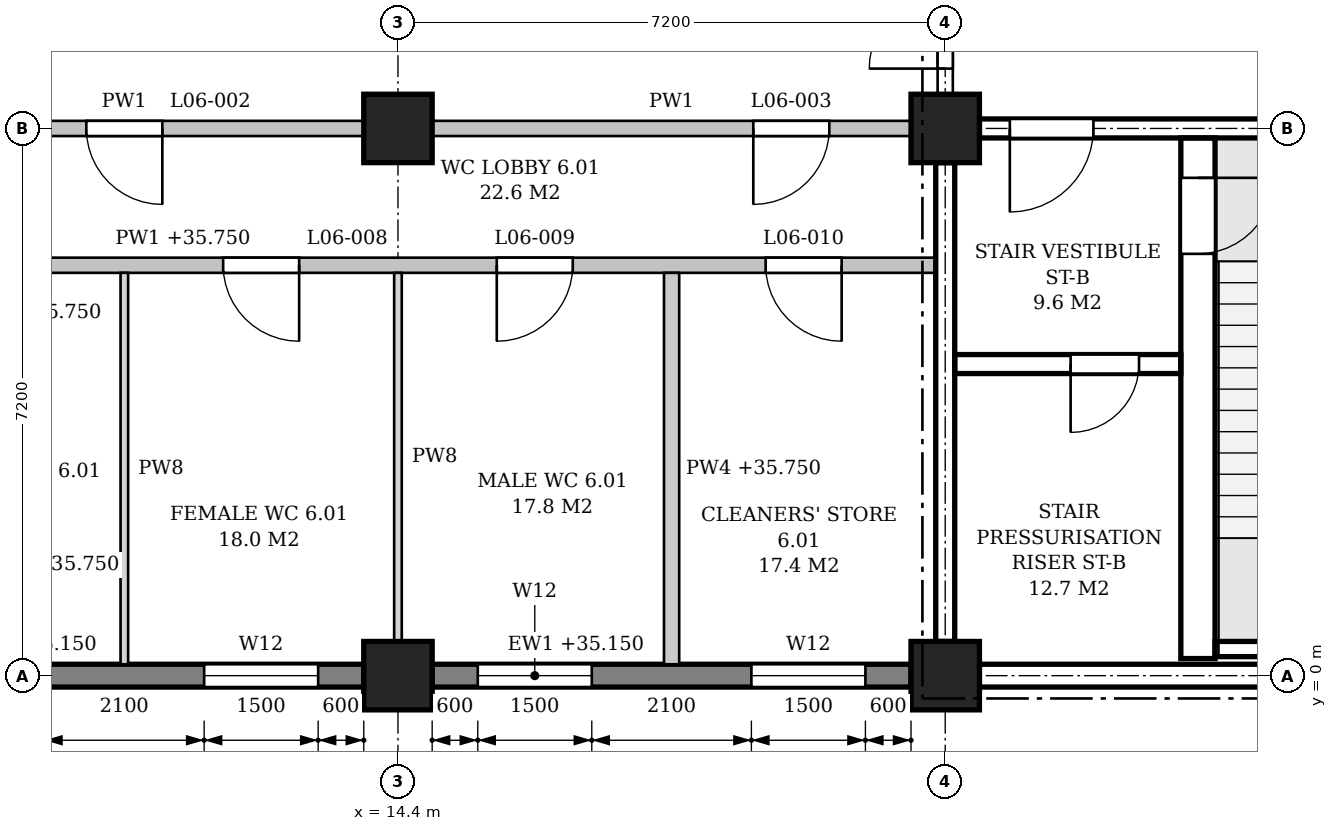
"""IFC4 building model, lengths in metres.
Left out: names, types, materials, properties, quantities, classifications, styles, units other than length and angle.
Written with IfcOpenShell. Run it as: python <this file> out.ifc"""

import sys

from ifc_helpers import new_model, si_unit, direction, frame, frame_2d, origin, origin_2d, place, context, subcontext, project, spatial, polyline, rectangle, outline, extrude, element, fill, save


model = new_model("IFC4")
c1 = context("Model", 3, precision=1e-05, world=origin(), true_north=direction((0.0, 1.0)))
c2 = subcontext(c1, "Body", "Model", "MODEL_VIEW")
j1 = project(units=[si_unit("LENGTHUNIT", "METRE"), si_unit("PLANEANGLEUNIT", "RADIAN")], contexts=[c1])
p1 = place(None, origin())
s1 = spatial("IfcSite", under=j1, at=p1, CompositionType="ELEMENT")
p2 = place(p1, origin())
s2 = spatial("IfcBuilding", under=s1, at=p2, CompositionType="ELEMENT")
p3 = place(p2, frame((0.0, 0.0, 31.2)))
s3 = spatial("IfcBuildingStorey", under=s2, at=p3, CompositionType="ELEMENT", Elevation=31.2)
for number, where, z_axis, x_axis in (
    (1, (14.4, 0.0, 0.0), (0.0, 0.0, 1.0), (1.0, 0.0, 0.0)),
    (2, (14.4, 7.2, 0.0), (0.0, 0.0, 1.0), (1.0, 0.0, 0.0)),
    (3, (21.6, 0.0, 0.0), (0.0, 0.0, 1.0), (1.0, 0.0, 0.0)),
    (4, (21.6, 7.2, 0.0), (0.0, 0.0, 1.0), (1.0, 0.0, 0.0)),
):
    element("IfcColumn", number, at=place(p3, frame(where, z_axis=z_axis, x_axis=x_axis)), inside=s3, PredefinedType="COLUMN", context=c2, shape_type="SweptSolid", body=[
        extrude(rectangle(XDim=0.9, YDim=0.9, at=origin_2d()), origin(), (0.0, 0.0, 1.0), 4.8),
    ])
p4 = place(p3, frame((7.65, 0.0, 0.0), z_axis=(0.0, 0.0, 1.0), x_axis=(1.0, 0.0, 0.0)))
e5 = element("IfcWall", 5, at=p4, inside=s3, PredefinedType="STANDARD", context=c2, shape_type="SweptSolid", body=[
    extrude(rectangle(XDim=6.3, YDim=0.3, at=frame_2d((3.15, 0.0))), origin(), (0.0, 0.0, 1.0), 3.95),
])
p5 = place(p4, frame((0.6, 0.0, 0.9)))
e6 = element("IfcOpeningElement", 6, at=p5, cuts=e5, PredefinedType="OPENING", context=c2, shape_type="SweptSolid", body=[
    extrude(outline(polyline([(0.0, 0.0), (1.5, 0.0), (1.5, 1.75), (0.75, 2.5), (0.0, 1.75), (0.0, 0.0)])), frame((0.0, 0.16, 0.0), z_axis=(0.0, -1.0, 0.0), x_axis=(1.0, 0.0, 0.0)), (0.0, 0.0, 1.0), 0.32),
])
p6 = place(p4, frame((4.2, 0.0, 0.9)))
e7 = element("IfcOpeningElement", 7, at=p6, cuts=e5, PredefinedType="OPENING", context=c2, shape_type="SweptSolid", body=[
    extrude(outline(polyline([(0.0, 0.0), (1.5, 0.0), (1.5, 1.75), (0.75, 2.5), (0.0, 1.75), (0.0, 0.0)])), frame((0.0, 0.16, 0.0), z_axis=(0.0, -1.0, 0.0), x_axis=(1.0, 0.0, 0.0)), (0.0, 0.0, 1.0), 0.32),
])
p7 = place(p3, frame((14.85, 0.0, 0.0), z_axis=(0.0, 0.0, 1.0), x_axis=(1.0, 0.0, 0.0)))
e8 = element("IfcWall", 8, at=p7, inside=s3, PredefinedType="STANDARD", context=c2, shape_type="SweptSolid", body=[
    extrude(rectangle(XDim=6.3, YDim=0.3, at=frame_2d((3.15, 0.0))), origin(), (0.0, 0.0, 1.0), 3.95),
])
p8 = place(p7, frame((0.6, 0.0, 0.9)))
e9 = element("IfcOpeningElement", 9, at=p8, cuts=e8, PredefinedType="OPENING", context=c2, shape_type="SweptSolid", body=[
    extrude(outline(polyline([(0.0, 0.0), (1.5, 0.0), (1.5, 1.75), (0.75, 2.5), (0.0, 1.75), (0.0, 0.0)])), frame((0.0, 0.16, 0.0), z_axis=(0.0, -1.0, 0.0), x_axis=(1.0, 0.0, 0.0)), (0.0, 0.0, 1.0), 0.32),
])
p9 = place(p7, frame((4.2, 0.0, 0.9)))
e10 = element("IfcOpeningElement", 10, at=p9, cuts=e8, PredefinedType="OPENING", context=c2, shape_type="SweptSolid", body=[
    extrude(outline(polyline([(0.0, 0.0), (1.5, 0.0), (1.5, 1.75), (0.75, 2.5), (0.0, 1.75), (0.0, 0.0)])), frame((0.0, 0.16, 0.0), z_axis=(0.0, -1.0, 0.0), x_axis=(1.0, 0.0, 0.0)), (0.0, 0.0, 1.0), 0.32),
])
p10 = place(p3, frame((22.05, 0.0, 0.0), z_axis=(0.0, 0.0, 1.0), x_axis=(1.0, 0.0, 0.0)))
e11 = element("IfcWall", 11, at=p10, inside=s3, PredefinedType="STANDARD", context=c2, shape_type="SweptSolid", body=[
    extrude(rectangle(XDim=6.3, YDim=0.3, at=frame_2d((3.15, 0.0))), origin(), (0.0, 0.0, 1.0), 3.95),
])
p11 = place(p10, frame((4.5, 0.0, 0.9)))
e12 = element("IfcOpeningElement", 12, at=p11, cuts=e11, PredefinedType="OPENING", context=c2, shape_type="SweptSolid", body=[
    extrude(outline(polyline([(0.0, 0.0), (0.9, 0.0), (0.9, 2.05), (0.45, 2.5), (0.0, 2.05), (0.0, 0.0)])), frame((0.0, 0.16, 0.0), z_axis=(0.0, -1.0, 0.0), x_axis=(1.0, 0.0, 0.0)), (0.0, 0.0, 1.0), 0.32),
])
p12 = place(p3, frame((22.05, 7.2, 0.0), z_axis=(0.0, 0.0, 1.0), x_axis=(1.0, 0.0, 0.0)))
e13 = element("IfcWall", 13, at=p12, inside=s3, PredefinedType="SHEAR", context=c2, shape_type="SweptSolid", body=[
    extrude(rectangle(XDim=6.3, YDim=0.25, at=frame_2d((3.15, 0.0))), origin(), (0.0, 0.0, 1.0), 3.8),
])
p13 = place(p12, frame((0.4, 0.0, 0.0)))
e14 = element("IfcOpeningElement", 14, at=p13, cuts=e13, PredefinedType="OPENING", context=c2, shape_type="SweptSolid", body=[
    extrude(rectangle(XDim=1.1, YDim=2.1, at=frame_2d((0.55, 1.05))), frame((0.0, 0.135, 0.0), z_axis=(0.0, -1.0, 0.0), x_axis=(1.0, 0.0, 0.0)), (0.0, 0.0, 1.0), 0.27),
])
p14 = place(p3, frame((21.6, 0.45, 0.0), z_axis=(0.0, 0.0, 1.0), x_axis=(0.0, 1.0, 0.0)))
e15 = element("IfcWall", 15, at=p14, inside=s3, PredefinedType="SHEAR", context=c2, shape_type="SweptSolid", body=[
    extrude(rectangle(XDim=6.3, YDim=0.25, at=frame_2d((3.15, 0.0))), origin(), (0.0, 0.0, 1.0), 3.8),
])
p15 = place(p3, frame((25.15, 0.35, -0.25), z_axis=(0.0, 0.0, 1.0), x_axis=(1.0, 0.0, 0.0)))
e16 = element("IfcWall", 16, at=p15, inside=s3, PredefinedType="SHEAR", context=c2, shape_type="SweptSolid", body=[
    extrude(rectangle(XDim=1.4, YDim=0.2, at=frame_2d((0.7, 0.0))), origin(), (0.0, 0.0, 1.0), 4.8),
])
p16 = place(p3, frame((24.925, 0.225, 0.0), z_axis=(0.0, 0.0, 1.0), x_axis=(0.0, 1.0, 0.0)))
e17 = element("IfcWall", 17, at=p16, inside=s3, PredefinedType="SHEAR", context=c2, shape_type="SweptSolid", body=[
    extrude(rectangle(XDim=6.85, YDim=0.45, at=frame_2d((3.425, 0.0))), origin(), (0.0, 0.0, 1.0), 4.55),
])
p17 = place(p16, frame((5.325, 0.0, 0.0)))
e18 = element("IfcOpeningElement", 18, at=p17, cuts=e17, PredefinedType="OPENING", context=c2, shape_type="SweptSolid", body=[
    extrude(rectangle(XDim=1.0, YDim=2.1, at=frame_2d((0.5, 1.05))), frame((0.0, 0.235, 0.0), z_axis=(0.0, -1.0, 0.0), x_axis=(1.0, 0.0, 0.0)), (0.0, 0.0, 1.0), 0.47),
])
p18 = place(p3, frame((21.725, 4.1, 0.0), z_axis=(0.0, 0.0, 1.0), x_axis=(1.0, 0.0, 0.0)))
e19 = element("IfcWall", 19, at=p18, inside=s3, PredefinedType="SHEAR", context=c2, shape_type="SweptSolid", body=[
    extrude(rectangle(XDim=2.975, YDim=0.25, at=frame_2d((1.487, 0.0))), origin(), (0.0, 0.0, 1.0), 4.55),
])
p19 = place(p18, frame((1.525, 0.0, 0.0)))
e20 = element("IfcOpeningElement", 20, at=p19, cuts=e19, PredefinedType="OPENING", context=c2, shape_type="SweptSolid", body=[
    extrude(rectangle(XDim=0.9, YDim=2.1, at=frame_2d((0.45, 1.05))), frame((0.0, 0.135, 0.0), z_axis=(0.0, -1.0, 0.0), x_axis=(1.0, 0.0, 0.0)), (0.0, 0.0, 1.0), 0.27),
])
p20 = place(p3, frame((7.325, 5.4, 0.0), z_axis=(0.0, 0.0, 1.0), x_axis=(1.0, 0.0, 0.0)))
e21 = element("IfcWall", 21, at=p20, inside=s3, PredefinedType="PARTITIONING", context=c2, shape_type="SweptSolid", body=[
    extrude(outline(polyline([(0.0, 0.0), (14.15, 0.0), (14.15, 3.8), (14.025, 3.8), (14.025, 4.55), (7.325, 4.55), (7.325, 3.8), (6.825, 3.8), (6.825, 4.55), (0.125, 4.55), (0.125, 3.8), (0.0, 3.8), (0.0, 0.0)])), frame((0.0, 0.1, 0.0), z_axis=(0.0, -1.0, 0.0), x_axis=(1.0, 0.0, 0.0)), (0.0, 0.0, 1.0), 0.2),
])
p21 = place(p20, frame((1.238, 0.0, 0.0)))
e22 = element("IfcOpeningElement", 22, at=p21, cuts=e21, PredefinedType="OPENING", context=c2, shape_type="SweptSolid", body=[
    extrude(rectangle(XDim=1.0, YDim=2.1, at=frame_2d((0.5, 1.05))), frame((0.0, 0.11, 0.0), z_axis=(0.0, -1.0, 0.0), x_axis=(1.0, 0.0, 0.0)), (0.0, 0.0, 1.0), 0.22),
])
p22 = place(p20, frame((4.775, 0.0, 0.0)))
e23 = element("IfcOpeningElement", 23, at=p22, cuts=e21, PredefinedType="OPENING", context=c2, shape_type="SweptSolid", body=[
    extrude(rectangle(XDim=1.0, YDim=2.1, at=frame_2d((0.5, 1.05))), frame((0.0, 0.11, 0.0), z_axis=(0.0, -1.0, 0.0), x_axis=(1.0, 0.0, 0.0)), (0.0, 0.0, 1.0), 0.22),
])
p23 = place(p20, frame((8.375, 0.0, 0.0)))
e24 = element("IfcOpeningElement", 24, at=p23, cuts=e21, PredefinedType="OPENING", context=c2, shape_type="SweptSolid", body=[
    extrude(rectangle(XDim=1.0, YDim=2.1, at=frame_2d((0.5, 1.05))), frame((0.0, 0.11, 0.0), z_axis=(0.0, -1.0, 0.0), x_axis=(1.0, 0.0, 0.0)), (0.0, 0.0, 1.0), 0.22),
])
p24 = place(p20, frame((11.913, 0.0, 0.0)))
e25 = element("IfcOpeningElement", 25, at=p24, cuts=e21, PredefinedType="OPENING", context=c2, shape_type="SweptSolid", body=[
    extrude(rectangle(XDim=1.0, YDim=2.1, at=frame_2d((0.5, 1.05))), frame((0.0, 0.11, 0.0), z_axis=(0.0, -1.0, 0.0), x_axis=(1.0, 0.0, 0.0)), (0.0, 0.0, 1.0), 0.22),
])
p25 = place(p3, frame((7.65, 7.2, 0.0), z_axis=(0.0, 0.0, 1.0), x_axis=(1.0, 0.0, 0.0)))
e26 = element("IfcWall", 26, at=p25, inside=s3, PredefinedType="PARTITIONING", context=c2, shape_type="SweptSolid", body=[
    extrude(rectangle(XDim=6.3, YDim=0.2, at=frame_2d((3.15, 0.0))), origin(), (0.0, 0.0, 1.0), 3.8),
])
p26 = place(p25, frame((2.65, 0.0, 0.0)))
e27 = element("IfcOpeningElement", 27, at=p26, cuts=e26, PredefinedType="OPENING", context=c2, shape_type="SweptSolid", body=[
    extrude(rectangle(XDim=1.0, YDim=2.1, at=frame_2d((0.5, 1.05))), frame((0.0, 0.11, 0.0), z_axis=(0.0, -1.0, 0.0), x_axis=(1.0, 0.0, 0.0)), (0.0, 0.0, 1.0), 0.22),
])
p27 = place(p3, frame((14.85, 7.2, 0.0), z_axis=(0.0, 0.0, 1.0), x_axis=(1.0, 0.0, 0.0)))
e28 = element("IfcWall", 28, at=p27, inside=s3, PredefinedType="PARTITIONING", context=c2, shape_type="SweptSolid", body=[
    extrude(rectangle(XDim=6.3, YDim=0.2, at=frame_2d((3.15, 0.0))), origin(), (0.0, 0.0, 1.0), 3.8),
])
p28 = place(p27, frame((4.225, 0.0, 0.0)))
e29 = element("IfcOpeningElement", 29, at=p28, cuts=e28, PredefinedType="OPENING", context=c2, shape_type="SweptSolid", body=[
    extrude(rectangle(XDim=1.0, YDim=2.1, at=frame_2d((0.5, 1.05))), frame((0.0, 0.11, 0.0), z_axis=(0.0, -1.0, 0.0), x_axis=(1.0, 0.0, 0.0)), (0.0, 0.0, 1.0), 0.22),
])
p29 = place(p3, frame((10.8, 0.15, 0.0), z_axis=(0.0, 0.0, 1.0), x_axis=(0.0, 1.0, 0.0)))
e30 = element("IfcWall", 30, at=p29, inside=s3, PredefinedType="PARTITIONING", context=c2, shape_type="SweptSolid", body=[
    extrude(rectangle(XDim=5.15, YDim=0.1, at=frame_2d((2.575, 0.0))), origin(), (0.0, 0.0, 1.0), 3.8),
])
p30 = place(p3, frame((14.4, 0.45, 0.0), z_axis=(0.0, 0.0, 1.0), x_axis=(0.0, 1.0, 0.0)))
e31 = element("IfcWall", 31, at=p30, inside=s3, PredefinedType="PARTITIONING", context=c2, shape_type="SweptSolid", body=[
    extrude(rectangle(XDim=4.85, YDim=0.1, at=frame_2d((2.425, 0.0))), origin(), (0.0, 0.0, 1.0), 3.8),
])
p31 = place(p3, frame((18.0, 0.15, 0.0), z_axis=(0.0, 0.0, 1.0), x_axis=(0.0, 1.0, 0.0)))
e32 = element("IfcWall", 32, at=p31, inside=s3, PredefinedType="PARTITIONING", context=c2, shape_type="SweptSolid", body=[
    extrude(outline(polyline([(0.0, 0.0), (5.15, 0.0), (5.15, 4.55), (0.1, 4.55), (0.1, 3.95), (0.0, 3.95), (0.0, 0.0)])), frame((0.0, 0.1, 0.0), z_axis=(0.0, -1.0, 0.0), x_axis=(1.0, 0.0, 0.0)), (0.0, 0.0, 1.0), 0.2),
])
p32 = place(p3, frame((21.6, 7.65, 0.0), z_axis=(0.0, 0.0, 1.0), x_axis=(0.0, 1.0, 0.0)))
e33 = element("IfcWall", 33, at=p32, inside=s3, PredefinedType="PARTITIONING", context=c2, shape_type="SweptSolid", body=[
    extrude(rectangle(XDim=2.675, YDim=0.2, at=frame_2d((1.337, 0.0))), origin(), (0.0, 0.0, 1.0), 3.8),
])
p33 = place(p32, frame((0.337, 0.0, 0.0)))
e34 = element("IfcOpeningElement", 34, at=p33, cuts=e33, PredefinedType="OPENING", context=c2, shape_type="SweptSolid", body=[
    extrude(rectangle(XDim=2.0, YDim=2.4, at=frame_2d((1.0, 1.2))), frame((0.0, 0.11, 0.0), z_axis=(0.0, -1.0, 0.0), x_axis=(1.0, 0.0, 0.0)), (0.0, 0.0, 1.0), 0.22),
])
p34 = place(p6, origin())
e35 = element("IfcWindow", 35, at=p34, inside=s3, PartitioningType="SINGLE_PANEL", PredefinedType="WINDOW", context=c2, shape_type="SweptSolid", body=[
    extrude(outline(polyline([(0.0, 0.0), (1.5, 0.0), (1.5, 1.75), (0.75, 2.5), (0.0, 1.75), (0.0, 0.0)])), frame((0.0, 0.03, 0.0), z_axis=(0.0, -1.0, 0.0), x_axis=(1.0, 0.0, 0.0)), (0.0, 0.0, 1.0), 0.06),
])
fill(e7, e35)
p35 = place(p8, origin())
e36 = element("IfcWindow", 36, at=p35, inside=s3, PartitioningType="SINGLE_PANEL", PredefinedType="WINDOW", context=c2, shape_type="SweptSolid", body=[
    extrude(outline(polyline([(0.0, 0.0), (1.5, 0.0), (1.5, 1.75), (0.75, 2.5), (0.0, 1.75), (0.0, 0.0)])), frame((0.0, 0.03, 0.0), z_axis=(0.0, -1.0, 0.0), x_axis=(1.0, 0.0, 0.0)), (0.0, 0.0, 1.0), 0.06),
])
fill(e9, e36)
p36 = place(p9, origin())
e37 = element("IfcWindow", 37, at=p36, inside=s3, PartitioningType="SINGLE_PANEL", PredefinedType="WINDOW", context=c2, shape_type="SweptSolid", body=[
    extrude(outline(polyline([(0.0, 0.0), (1.5, 0.0), (1.5, 1.75), (0.75, 2.5), (0.0, 1.75), (0.0, 0.0)])), frame((0.0, 0.03, 0.0), z_axis=(0.0, -1.0, 0.0), x_axis=(1.0, 0.0, 0.0)), (0.0, 0.0, 1.0), 0.06),
])
fill(e10, e37)
p37 = place(p17, frame((1.0, 0.0, 0.0), z_axis=(0.0, 0.0, 1.0), x_axis=(-1.0, 0.0, 0.0)))
e38 = element("IfcDoor", 38, at=p37, inside=s3, OperationType="SINGLE_SWING_LEFT", PredefinedType="DOOR", context=c2, shape_type="SweptSolid", body=[
    extrude(rectangle(XDim=1.0, YDim=2.1, at=frame_2d((0.5, 1.05))), frame((0.0, 0.025, 0.0), z_axis=(0.0, -1.0, 0.0), x_axis=(1.0, 0.0, 0.0)), (0.0, 0.0, 1.0), 0.05),
])
fill(e18, e38)
p38 = place(p13, frame((1.1, 0.0, 0.0), z_axis=(0.0, 0.0, 1.0), x_axis=(-1.0, 0.0, 0.0)))
e39 = element("IfcDoor", 39, at=p38, inside=s3, OperationType="SINGLE_SWING_RIGHT", PredefinedType="DOOR", context=c2, shape_type="SweptSolid", body=[
    extrude(rectangle(XDim=1.1, YDim=2.1, at=frame_2d((0.55, 1.05))), frame((0.0, 0.025, 0.0), z_axis=(0.0, -1.0, 0.0), x_axis=(1.0, 0.0, 0.0)), (0.0, 0.0, 1.0), 0.05),
])
fill(e14, e39)
p39 = place(p19, frame((0.9, 0.0, 0.0), z_axis=(0.0, 0.0, 1.0), x_axis=(-1.0, 0.0, 0.0)))
e40 = element("IfcDoor", 40, at=p39, inside=s3, OperationType="SINGLE_SWING_RIGHT", PredefinedType="DOOR", context=c2, shape_type="SweptSolid", body=[
    extrude(rectangle(XDim=0.9, YDim=2.1, at=frame_2d((0.45, 1.05))), frame((0.0, 0.025, 0.0), z_axis=(0.0, -1.0, 0.0), x_axis=(1.0, 0.0, 0.0)), (0.0, 0.0, 1.0), 0.05),
])
fill(e20, e40)
p40 = place(p33, origin())
e41 = element("IfcDoor", 41, at=p40, inside=s3, OperationType="DOUBLE_DOOR_SINGLE_SWING", PredefinedType="DOOR", context=c2, shape_type="SweptSolid", body=[
    extrude(rectangle(XDim=2.0, YDim=2.4, at=frame_2d((1.0, 1.2))), frame((0.0, 0.025, 0.0), z_axis=(0.0, -1.0, 0.0), x_axis=(1.0, 0.0, 0.0)), (0.0, 0.0, 1.0), 0.05),
])
fill(e34, e41)
p41 = place(p26, frame((1.0, 0.0, 0.0), z_axis=(0.0, 0.0, 1.0), x_axis=(-1.0, 0.0, 0.0)))
e42 = element("IfcDoor", 42, at=p41, inside=s3, OperationType="SINGLE_SWING_LEFT", PredefinedType="DOOR", context=c2, shape_type="SweptSolid", body=[
    extrude(rectangle(XDim=1.0, YDim=2.1, at=frame_2d((0.5, 1.05))), frame((0.0, 0.025, 0.0), z_axis=(0.0, -1.0, 0.0), x_axis=(1.0, 0.0, 0.0)), (0.0, 0.0, 1.0), 0.05),
])
fill(e27, e42)
p42 = place(p28, frame((1.0, 0.0, 0.0), z_axis=(0.0, 0.0, 1.0), x_axis=(-1.0, 0.0, 0.0)))
e43 = element("IfcDoor", 43, at=p42, inside=s3, OperationType="SINGLE_SWING_RIGHT", PredefinedType="DOOR", context=c2, shape_type="SweptSolid", body=[
    extrude(rectangle(XDim=1.0, YDim=2.1, at=frame_2d((0.5, 1.05))), frame((0.0, 0.025, 0.0), z_axis=(0.0, -1.0, 0.0), x_axis=(1.0, 0.0, 0.0)), (0.0, 0.0, 1.0), 0.05),
])
fill(e29, e43)
p43 = place(p22, frame((1.0, 0.0, 0.0), z_axis=(0.0, 0.0, 1.0), x_axis=(-1.0, 0.0, 0.0)))
e44 = element("IfcDoor", 44, at=p43, inside=s3, OperationType="SINGLE_SWING_LEFT", PredefinedType="DOOR", context=c2, shape_type="SweptSolid", body=[
    extrude(rectangle(XDim=1.0, YDim=2.1, at=frame_2d((0.5, 1.05))), frame((0.0, 0.025, 0.0), z_axis=(0.0, -1.0, 0.0), x_axis=(1.0, 0.0, 0.0)), (0.0, 0.0, 1.0), 0.05),
])
fill(e23, e44)
p44 = place(p23, frame((1.0, 0.0, 0.0), z_axis=(0.0, 0.0, 1.0), x_axis=(-1.0, 0.0, 0.0)))
e45 = element("IfcDoor", 45, at=p44, inside=s3, OperationType="SINGLE_SWING_RIGHT", PredefinedType="DOOR", context=c2, shape_type="SweptSolid", body=[
    extrude(rectangle(XDim=1.0, YDim=2.1, at=frame_2d((0.5, 1.05))), frame((0.0, 0.025, 0.0), z_axis=(0.0, -1.0, 0.0), x_axis=(1.0, 0.0, 0.0)), (0.0, 0.0, 1.0), 0.05),
])
fill(e24, e45)
p45 = place(p24, frame((1.0, 0.0, 0.0), z_axis=(0.0, 0.0, 1.0), x_axis=(-1.0, 0.0, 0.0)))
e46 = element("IfcDoor", 46, at=p45, inside=s3, OperationType="SINGLE_SWING_LEFT", PredefinedType="DOOR", context=c2, shape_type="SweptSolid", body=[
    extrude(rectangle(XDim=1.0, YDim=2.1, at=frame_2d((0.5, 1.05))), frame((0.0, 0.025, 0.0), z_axis=(0.0, -1.0, 0.0), x_axis=(1.0, 0.0, 0.0)), (0.0, 0.0, 1.0), 0.05),
])
fill(e25, e46)
save(model, sys.argv[1])
